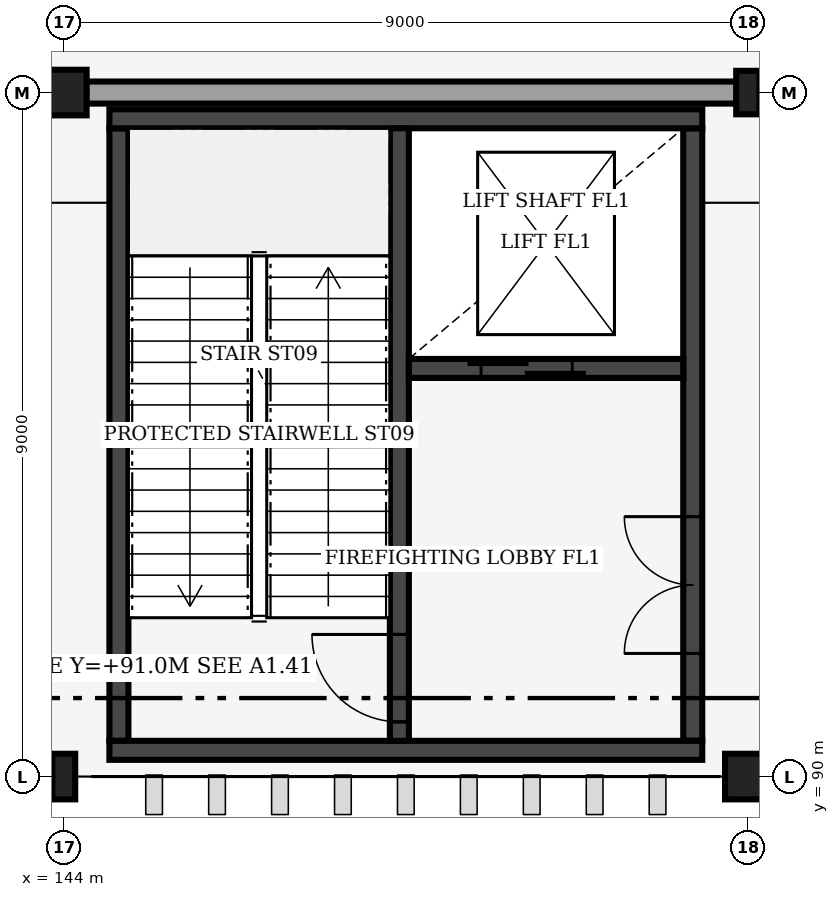
"""IFC4 building model, lengths in metres.
Left out: names, types, materials, properties, quantities, classifications, styles, units other than length and angle.
Written with IfcOpenShell. Run it as: python <this file> out.ifc"""

import sys

from ifc_helpers import new_model, si_unit, direction, frame, frame_2d, origin, origin_2d, place, context, subcontext, project, spatial, rectangle, i_section, extrude, element, fill, save


model = new_model("IFC4")
c1 = context("Model", 3, precision=1e-05, world=origin(), true_north=direction((0.0, 1.0)))
c2 = subcontext(c1, "Body", "Model", "MODEL_VIEW")
j1 = project(units=[si_unit("LENGTHUNIT", "METRE"), si_unit("PLANEANGLEUNIT", "RADIAN")], contexts=[c1])
p1 = place(None, origin())
s1 = spatial("IfcSite", under=j1, at=p1, CompositionType="ELEMENT")
p2 = place(p1, origin())
s2 = spatial("IfcBuilding", under=s1, at=p2, CompositionType="ELEMENT")
p3 = place(p2, frame((0.0, 0.0, 12.0)))
s3 = spatial("IfcBuildingStorey", under=s2, at=p3, CompositionType="ELEMENT", Elevation=12.0)
p4 = place(p3, frame((144.0, 90.0, 0.0), z_axis=(0.0, 0.0, 1.0), x_axis=(1.0, 0.0, 0.0)))
e1 = element("IfcColumn", 1, at=p4, inside=s3, PredefinedType="COLUMN", context=c2, shape_type="SweptSolid", body=[
    extrude(i_section(OverallWidth=0.3, OverallDepth=0.6, WebThickness=0.015, FlangeThickness=0.03, FilletRadius=0.027, at=origin_2d()), origin(), (0.0, 0.0, 1.0), 6.0),
])
for number, where, z_axis, x_axis in (
    (2, (144.0, 99.0, 0.0), (0.0, 0.0, 1.0), (1.0, 0.0, 0.0)),
    (3, (153.0, 90.0, 0.0), (0.0, 0.0, 1.0), (1.0, 0.0, 0.0)),
):
    element("IfcColumn", number, at=place(p3, frame(where, z_axis=z_axis, x_axis=x_axis)), inside=s3, PredefinedType="COLUMN", context=c2, shape_type="SweptSolid", body=[
        extrude(rectangle(XDim=0.6, YDim=0.6, at=origin_2d()), origin(), (0.0, 0.0, 1.0), 6.0),
    ])
p5 = place(p3, frame((153.0, 99.0, 0.0), z_axis=(0.0, 0.0, 1.0), x_axis=(1.0, 0.0, 0.0)))
e4 = element("IfcColumn", 4, at=p5, inside=s3, PredefinedType="COLUMN", context=c2, shape_type="SweptSolid", body=[
    extrude(i_section(OverallWidth=0.306, OverallDepth=0.572, WebThickness=0.021, FlangeThickness=0.04, FilletRadius=0.027, at=origin_2d()), origin(), (0.0, 0.0, 1.0), 6.0),
])
p6 = place(p3, frame((144.295, 99.0, 0.0), z_axis=(0.0, 0.0, 1.0), x_axis=(1.0, 0.0, 0.0)))
e5 = element("IfcWall", 5, at=p6, inside=s3, PredefinedType="SOLIDWALL", context=c2, shape_type="SweptSolid", body=[
    extrude(rectangle(XDim=8.557, YDim=0.29, at=frame_2d((4.279, 0.0))), origin(), (0.0, 0.0, 1.0), 4.8),
])
p7 = place(p3, frame((144.725, 90.47, 0.0), z_axis=(0.0, 0.0, 1.0), x_axis=(0.0, 1.0, 0.0)))
e6 = element("IfcWall", 6, at=p7, inside=s3, PredefinedType="SHEAR", context=c2, shape_type="SweptSolid", body=[
    extrude(rectangle(XDim=8.06, YDim=0.25, at=frame_2d((4.03, 0.0))), origin(), (0.0, 0.0, 1.0), 5.64),
])
p8 = place(p3, frame((152.275, 90.47, 0.0), z_axis=(0.0, 0.0, 1.0), x_axis=(0.0, 1.0, 0.0)))
e7 = element("IfcWall", 7, at=p8, inside=s3, PredefinedType="SHEAR", context=c2, shape_type="SweptSolid", body=[
    extrude(rectangle(XDim=8.06, YDim=0.25, at=frame_2d((4.03, 0.0))), origin(), (0.0, 0.0, 1.0), 5.64),
])
p9 = place(p8, frame((1.15, 0.0, 0.0)))
e8 = element("IfcOpeningElement", 8, at=p9, cuts=e7, PredefinedType="OPENING", context=c2, shape_type="SweptSolid", body=[
    extrude(rectangle(XDim=1.8, YDim=2.2, at=frame_2d((0.9, 1.1))), frame((0.0, 0.135, 0.0), z_axis=(0.0, -1.0, 0.0), x_axis=(1.0, 0.0, 0.0)), (0.0, 0.0, 1.0), 0.27),
])
for number, where, z_axis, x_axis in (
    (9, (144.6, 90.345, 0.0), (0.0, 0.0, 1.0), (1.0, 0.0, 0.0)),
    (10, (144.6, 98.655, 0.0), (0.0, 0.0, 1.0), (1.0, 0.0, 0.0)),
):
    element("IfcWall", number, at=place(p3, frame(where, z_axis=z_axis, x_axis=x_axis)), inside=s3, PredefinedType="SHEAR", context=c2, shape_type="SweptSolid", body=[
        extrude(rectangle(XDim=7.8, YDim=0.25, at=frame_2d((3.9, 0.0))), origin(), (0.0, 0.0, 1.0), 5.64),
    ])
p10 = place(p3, frame((148.415, 90.47, 0.0), z_axis=(0.0, 0.0, 1.0), x_axis=(0.0, 1.0, 0.0)))
e11 = element("IfcWall", 11, at=p10, inside=s3, PredefinedType="SHEAR", context=c2, shape_type="SweptSolid", body=[
    extrude(rectangle(XDim=8.06, YDim=0.25, at=frame_2d((4.03, 0.0))), origin(), (0.0, 0.0, 1.0), 5.64),
])
p11 = place(p10, frame((0.25, 0.0, 0.0)))
e12 = element("IfcOpeningElement", 12, at=p11, cuts=e11, PredefinedType="OPENING", context=c2, shape_type="SweptSolid", body=[
    extrude(rectangle(XDim=1.15, YDim=2.15, at=frame_2d((0.575, 1.075))), frame((0.0, 0.135, 0.0), z_axis=(0.0, -1.0, 0.0), x_axis=(1.0, 0.0, 0.0)), (0.0, 0.0, 1.0), 0.27),
])
p12 = place(p3, frame((148.54, 95.37, 0.0), z_axis=(0.0, 0.0, 1.0), x_axis=(1.0, 0.0, 0.0)))
e13 = element("IfcWall", 13, at=p12, inside=s3, PredefinedType="SHEAR", context=c2, shape_type="SweptSolid", body=[
    extrude(rectangle(XDim=3.61, YDim=0.25, at=frame_2d((1.805, 0.0))), origin(), (0.0, 0.0, 1.0), 5.64),
])
p13 = place(p12, frame((0.95, 0.0, 0.0)))
e14 = element("IfcOpeningElement", 14, at=p13, cuts=e13, PredefinedType="OPENING", context=c2, shape_type="SweptSolid", body=[
    extrude(rectangle(XDim=1.2, YDim=2.2, at=frame_2d((0.6, 1.1))), frame((0.0, 0.135, 0.0), z_axis=(0.0, -1.0, 0.0), x_axis=(1.0, 0.0, 0.0)), (0.0, 0.0, 1.0), 0.27),
])
p14 = place(p11, origin())
e15 = element("IfcDoor", 15, at=p14, inside=s3, OperationType="SINGLE_SWING_RIGHT", PredefinedType="DOOR", context=c2, shape_type="SweptSolid", body=[
    extrude(rectangle(XDim=1.15, YDim=2.15, at=frame_2d((0.575, 1.075))), frame((0.0, 0.025, 0.0), z_axis=(0.0, -1.0, 0.0), x_axis=(1.0, 0.0, 0.0)), (0.0, 0.0, 1.0), 0.05),
])
fill(e12, e15)
p15 = place(p13, origin())
e16 = element("IfcDoor", 16, at=p15, inside=s3, OperationType="DOUBLE_DOOR_SLIDING", PredefinedType="DOOR", context=c2, shape_type="SweptSolid", body=[
    extrude(rectangle(XDim=1.2, YDim=2.2, at=frame_2d((0.6, 1.1))), frame((0.0, 0.025, 0.0), z_axis=(0.0, -1.0, 0.0), x_axis=(1.0, 0.0, 0.0)), (0.0, 0.0, 1.0), 0.05),
])
fill(e14, e16)
p16 = place(p9, origin())
e17 = element("IfcDoor", 17, at=p16, inside=s3, OperationType="DOUBLE_DOOR_SINGLE_SWING", PredefinedType="DOOR", context=c2, shape_type="SweptSolid", body=[
    extrude(rectangle(XDim=1.8, YDim=2.2, at=frame_2d((0.9, 1.1))), frame((0.0, 0.025, 0.0), z_axis=(0.0, -1.0, 0.0), x_axis=(1.0, 0.0, 0.0)), (0.0, 0.0, 1.0), 0.05),
])
fill(e8, e17)
save(model, sys.argv[1])
